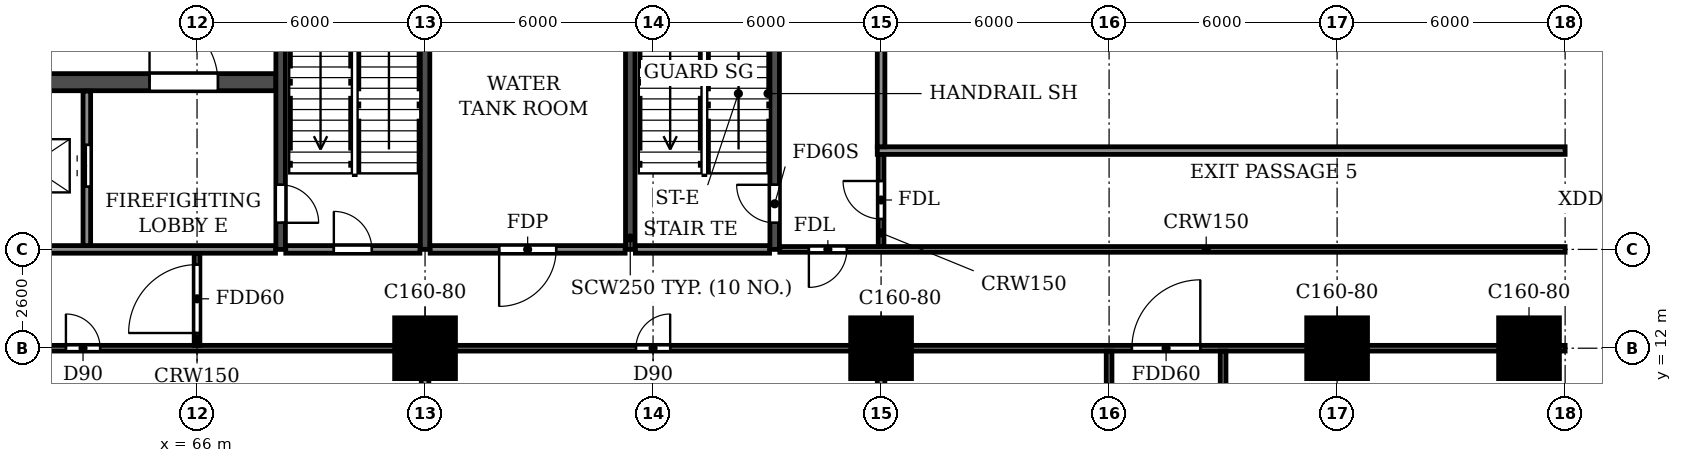
"""IFC4 building model, lengths in metres.
Left out: names, types, materials, properties, quantities, classifications, styles, units other than length and angle.
Written with IfcOpenShell. Run it as: python <this file> out.ifc"""

import sys

from ifc_helpers import new_model, si_unit, direction, frame, frame_2d, origin, origin_2d, place, context, subcontext, project, spatial, rectangle, extrude, source, transform, mapped, element, fill, save


model = new_model("IFC4")
c1 = context("Model", 3, precision=1e-05, world=origin(), true_north=direction((0.0, 1.0)))
c2 = subcontext(c1, "Body", "Model", "MODEL_VIEW")
j1 = project(units=[si_unit("LENGTHUNIT", "METRE"), si_unit("PLANEANGLEUNIT", "RADIAN")], contexts=[c1])
p1 = place(None, origin())
s1 = spatial("IfcSite", under=j1, at=p1, CompositionType="ELEMENT")
p2 = place(p1, origin())
s2 = spatial("IfcBuilding", under=s1, at=p2, CompositionType="ELEMENT")
p3 = place(p2, origin())
s3 = spatial("IfcBuildingStorey", under=s2, at=p3, CompositionType="ELEMENT", Elevation=0.0)
m1 = source(origin(), c2, "Body", "SweptSolid", [
    extrude(rectangle(XDim=1.6, YDim=1.6, at=origin_2d()), origin(), (0.0, 0.0, 1.0), 4.5),
])
for number, where, z_axis, x_axis in (
    (1, (72.0, 12.0, -0.3), (0.0, 0.0, 1.0), (1.0, 0.0, 0.0)),
    (2, (84.0, 12.0, -0.3), (0.0, 0.0, 1.0), (1.0, 0.0, 0.0)),
    (3, (96.0, 12.0, -0.3), (0.0, 0.0, 1.0), (1.0, 0.0, 0.0)),
    (4, (101.05, 12.0, -0.3), (0.0, 0.0, 1.0), (1.0, 0.0, 0.0)),
):
    element("IfcColumn", number, at=place(p3, frame(where, z_axis=z_axis, x_axis=x_axis)), inside=s3, PredefinedType="COLUMN", context=c2, shape_type="MappedRepresentation", body=[
        mapped(m1, transform((0.0, 0.0, 0.0))),
    ])
p4 = place(p3, frame((33.925, 19.0, 0.0), z_axis=(0.0, 0.0, 1.0), x_axis=(1.0, 0.0, 0.0)))
e5 = element("IfcWall", 5, at=p4, inside=s3, PredefinedType="SOLIDWALL", context=c2, shape_type="SweptSolid", body=[
    extrude(rectangle(XDim=34.15, YDim=0.45, at=frame_2d((17.075, 0.0))), origin(), (0.0, 0.0, 1.0), 4.2),
])
p5 = place(p4, frame((16.175, 0.0, 0.0)))
e6 = element("IfcOpeningElement", 6, at=p5, cuts=e5, PredefinedType="OPENING", context=c2, shape_type="SweptSolid", body=[
    extrude(rectangle(XDim=1.8, YDim=2.1, at=frame_2d((0.9, 1.05))), frame((0.0, 0.235, 0.0), z_axis=(0.0, -1.0, 0.0), x_axis=(1.0, 0.0, 0.0)), (0.0, 0.0, 1.0), 0.47),
])
p6 = place(p4, frame((1.525, 0.0, 0.0)))
e7 = element("IfcOpeningElement", 7, at=p6, cuts=e5, PredefinedType="OPENING", context=c2, shape_type="SweptSolid", body=[
    extrude(rectangle(XDim=1.8, YDim=2.1, at=frame_2d((0.9, 1.05))), frame((0.0, 0.235, 0.0), z_axis=(0.0, -1.0, 0.0), x_axis=(1.0, 0.0, 0.0)), (0.0, 0.0, 1.0), 0.47),
])
p7 = place(p4, frame((8.725, 0.0, 0.0)))
e8 = element("IfcOpeningElement", 8, at=p7, cuts=e5, PredefinedType="OPENING", context=c2, shape_type="SweptSolid", body=[
    extrude(rectangle(XDim=1.1, YDim=2.1, at=frame_2d((0.55, 1.05))), frame((0.0, 0.235, 0.0), z_axis=(0.0, -1.0, 0.0), x_axis=(1.0, 0.0, 0.0)), (0.0, 0.0, 1.0), 0.47),
])
p8 = place(p4, frame((11.325, 0.0, 0.0)))
e9 = element("IfcOpeningElement", 9, at=p8, cuts=e5, PredefinedType="OPENING", context=c2, shape_type="SweptSolid", body=[
    extrude(rectangle(XDim=1.1, YDim=2.1, at=frame_2d((0.55, 1.05))), frame((0.0, 0.235, 0.0), z_axis=(0.0, -1.0, 0.0), x_axis=(1.0, 0.0, 0.0)), (0.0, 0.0, 1.0), 0.47),
])
p9 = place(p4, frame((13.925, 0.0, 0.0)))
e10 = element("IfcOpeningElement", 10, at=p9, cuts=e5, PredefinedType="OPENING", context=c2, shape_type="SweptSolid", body=[
    extrude(rectangle(XDim=1.1, YDim=2.1, at=frame_2d((0.55, 1.05))), frame((0.0, 0.235, 0.0), z_axis=(0.0, -1.0, 0.0), x_axis=(1.0, 0.0, 0.0)), (0.0, 0.0, 1.0), 0.47),
])
p10 = place(p4, frame((19.125, 0.0, 0.0)))
e11 = element("IfcOpeningElement", 11, at=p10, cuts=e5, PredefinedType="OPENING", context=c2, shape_type="SweptSolid", body=[
    extrude(rectangle(XDim=1.1, YDim=2.1, at=frame_2d((0.55, 1.05))), frame((0.0, 0.235, 0.0), z_axis=(0.0, -1.0, 0.0), x_axis=(1.0, 0.0, 0.0)), (0.0, 0.0, 1.0), 0.47),
])
p11 = place(p4, frame((21.725, 0.0, 0.0)))
e12 = element("IfcOpeningElement", 12, at=p11, cuts=e5, PredefinedType="OPENING", context=c2, shape_type="SweptSolid", body=[
    extrude(rectangle(XDim=1.1, YDim=2.1, at=frame_2d((0.55, 1.05))), frame((0.0, 0.235, 0.0), z_axis=(0.0, -1.0, 0.0), x_axis=(1.0, 0.0, 0.0)), (0.0, 0.0, 1.0), 0.47),
])
p12 = place(p4, frame((24.325, 0.0, 0.0)))
e13 = element("IfcOpeningElement", 13, at=p12, cuts=e5, PredefinedType="OPENING", context=c2, shape_type="SweptSolid", body=[
    extrude(rectangle(XDim=1.1, YDim=2.1, at=frame_2d((0.55, 1.05))), frame((0.0, 0.235, 0.0), z_axis=(0.0, -1.0, 0.0), x_axis=(1.0, 0.0, 0.0)), (0.0, 0.0, 1.0), 0.47),
])
p13 = place(p4, frame((30.825, 0.0, 0.0)))
e14 = element("IfcOpeningElement", 14, at=p13, cuts=e5, PredefinedType="OPENING", context=c2, shape_type="SweptSolid", body=[
    extrude(rectangle(XDim=1.8, YDim=2.1, at=frame_2d((0.9, 1.05))), frame((0.0, 0.235, 0.0), z_axis=(0.0, -1.0, 0.0), x_axis=(1.0, 0.0, 0.0)), (0.0, 0.0, 1.0), 0.47),
])
p14 = place(p3, frame((68.2, 14.6, 0.0), z_axis=(0.0, 0.0, 1.0), x_axis=(0.0, 1.0, 0.0)))
e15 = element("IfcWall", 15, at=p14, inside=s3, PredefinedType="SOLIDWALL", context=c2, shape_type="SweptSolid", body=[
    extrude(rectangle(XDim=7.875, YDim=0.25, at=frame_2d((3.938, 0.0))), origin(), (0.0, 0.0, 1.0), 4.2),
])
p15 = place(p14, frame((0.7, 0.0, 0.0)))
e16 = element("IfcOpeningElement", 16, at=p15, cuts=e15, PredefinedType="OPENING", context=c2, shape_type="SweptSolid", body=[
    extrude(rectangle(XDim=1.0, YDim=2.1, at=frame_2d((0.5, 1.05))), frame((0.0, 0.135, 0.0), z_axis=(0.0, -1.0, 0.0), x_axis=(1.0, 0.0, 0.0)), (0.0, 0.0, 1.0), 0.27),
])
for number, where, z_axis, x_axis in (
    (17, (72.0, 14.6, 0.0), (0.0, 0.0, 1.0), (0.0, 1.0, 0.0)),
    (18, (77.4, 14.6, 0.0), (0.0, 0.0, 1.0), (0.0, 1.0, 0.0)),
):
    element("IfcWall", number, at=place(p3, frame(where, z_axis=z_axis, x_axis=x_axis)), inside=s3, PredefinedType="SOLIDWALL", context=c2, shape_type="SweptSolid", body=[
        extrude(rectangle(XDim=7.875, YDim=0.25, at=frame_2d((3.938, 0.0))), origin(), (0.0, 0.0, 1.0), 4.2),
    ])
p16 = place(p3, frame((81.2, 14.6, 0.0), z_axis=(0.0, 0.0, 1.0), x_axis=(0.0, 1.0, 0.0)))
e19 = element("IfcWall", 19, at=p16, inside=s3, PredefinedType="SOLIDWALL", context=c2, shape_type="SweptSolid", body=[
    extrude(rectangle(XDim=7.875, YDim=0.25, at=frame_2d((3.938, 0.0))), origin(), (0.0, 0.0, 1.0), 4.2),
])
p17 = place(p16, frame((0.7, 0.0, 0.0)))
e20 = element("IfcOpeningElement", 20, at=p17, cuts=e19, PredefinedType="OPENING", context=c2, shape_type="SweptSolid", body=[
    extrude(rectangle(XDim=1.0, YDim=2.1, at=frame_2d((0.5, 1.05))), frame((0.0, 0.135, 0.0), z_axis=(0.0, -1.0, 0.0), x_axis=(1.0, 0.0, 0.0)), (0.0, 0.0, 1.0), 0.27),
])
p18 = place(p3, frame((38.9, 12.0, 0.0), z_axis=(0.0, 0.0, 1.0), x_axis=(1.0, 0.0, 0.0)))
e21 = element("IfcWall", 21, at=p18, inside=s3, PredefinedType="PARTITIONING", context=c2, shape_type="SweptSolid", body=[
    extrude(rectangle(XDim=63.1, YDim=0.15, at=frame_2d((31.55, 0.0))), origin(), (0.0, 0.0, 1.0), 4.2),
])
p19 = place(p18, frame((10.2, 0.0, 0.0)))
e22 = element("IfcOpeningElement", 22, at=p19, cuts=e21, PredefinedType="OPENING", context=c2, shape_type="SweptSolid", body=[
    extrude(rectangle(XDim=1.8, YDim=2.1, at=frame_2d((0.9, 1.05))), frame((0.0, 0.085, 0.0), z_axis=(0.0, -1.0, 0.0), x_axis=(1.0, 0.0, 0.0)), (0.0, 0.0, 1.0), 0.17),
])
p20 = place(p18, frame((23.65, 0.0, 0.0)))
e23 = element("IfcOpeningElement", 23, at=p20, cuts=e21, PredefinedType="OPENING", context=c2, shape_type="SweptSolid", body=[
    extrude(rectangle(XDim=0.9, YDim=2.1, at=frame_2d((0.45, 1.05))), frame((0.0, 0.085, 0.0), z_axis=(0.0, -1.0, 0.0), x_axis=(1.0, 0.0, 0.0)), (0.0, 0.0, 1.0), 0.17),
])
p21 = place(p18, frame((38.65, 0.0, 0.0)))
e24 = element("IfcOpeningElement", 24, at=p21, cuts=e21, PredefinedType="OPENING", context=c2, shape_type="SweptSolid", body=[
    extrude(rectangle(XDim=0.9, YDim=2.1, at=frame_2d((0.45, 1.05))), frame((0.0, 0.085, 0.0), z_axis=(0.0, -1.0, 0.0), x_axis=(1.0, 0.0, 0.0)), (0.0, 0.0, 1.0), 0.17),
])
p22 = place(p18, frame((51.7, 0.0, 0.0)))
e25 = element("IfcOpeningElement", 25, at=p22, cuts=e21, PredefinedType="OPENING", context=c2, shape_type="SweptSolid", body=[
    extrude(rectangle(XDim=1.8, YDim=2.1, at=frame_2d((0.9, 1.05))), frame((0.0, 0.085, 0.0), z_axis=(0.0, -1.0, 0.0), x_axis=(1.0, 0.0, 0.0)), (0.0, 0.0, 1.0), 0.17),
])
p23 = place(p3, frame((81.335, 14.6, 0.0), z_axis=(0.0, 0.0, 1.0), x_axis=(1.0, 0.0, 0.0)))
e26 = element("IfcWall", 26, at=p23, inside=s3, PredefinedType="PARTITIONING", context=c2, shape_type="SweptSolid", body=[
    extrude(rectangle(XDim=20.665, YDim=0.15, at=frame_2d((10.333, 0.0))), origin(), (0.0, 0.0, 1.0), 4.2),
])
p24 = place(p23, frame((0.765, 0.0, 0.0)))
e27 = element("IfcOpeningElement", 27, at=p24, cuts=e26, PredefinedType="OPENING", context=c2, shape_type="SweptSolid", body=[
    extrude(rectangle(XDim=1.0, YDim=2.1, at=frame_2d((0.5, 1.05))), frame((0.0, 0.085, 0.0), z_axis=(0.0, -1.0, 0.0), x_axis=(1.0, 0.0, 0.0)), (0.0, 0.0, 1.0), 0.17),
])
p25 = place(p3, frame((66.0, 12.075, 0.0), z_axis=(0.0, 0.0, 1.0), x_axis=(0.0, 1.0, 0.0)))
e28 = element("IfcWall", 28, at=p25, inside=s3, PredefinedType="PARTITIONING", context=c2, shape_type="SweptSolid", body=[
    extrude(rectangle(XDim=2.425, YDim=0.15, at=frame_2d((1.212, 0.0))), origin(), (0.0, 0.0, 1.0), 4.2),
])
p26 = place(p25, frame((0.325, 0.0, 0.0)))
e29 = element("IfcOpeningElement", 29, at=p26, cuts=e28, PredefinedType="OPENING", context=c2, shape_type="SweptSolid", body=[
    extrude(rectangle(XDim=1.8, YDim=2.1, at=frame_2d((0.9, 1.05))), frame((0.0, 0.085, 0.0), z_axis=(0.0, -1.0, 0.0), x_axis=(1.0, 0.0, 0.0)), (0.0, 0.0, 1.0), 0.17),
])
p27 = place(p3, frame((84.0, 14.675, 0.0), z_axis=(0.0, 0.0, 1.0), x_axis=(0.0, 1.0, 0.0)))
e30 = element("IfcWall", 30, at=p27, inside=s3, PredefinedType="PARTITIONING", context=c2, shape_type="SweptSolid", body=[
    extrude(rectangle(XDim=2.425, YDim=0.15, at=frame_2d((1.212, 0.0))), origin(), (0.0, 0.0, 1.0), 4.2),
])
p28 = place(p27, frame((0.725, 0.0, 0.0)))
e31 = element("IfcOpeningElement", 31, at=p28, cuts=e30, PredefinedType="OPENING", context=c2, shape_type="SweptSolid", body=[
    extrude(rectangle(XDim=1.0, YDim=2.1, at=frame_2d((0.5, 1.05))), frame((0.0, 0.085, 0.0), z_axis=(0.0, -1.0, 0.0), x_axis=(1.0, 0.0, 0.0)), (0.0, 0.0, 1.0), 0.17),
])
p29 = place(p3, frame((90.0, 0.06, 0.0), z_axis=(0.0, 0.0, 1.0), x_axis=(0.0, 1.0, 0.0)))
e32 = element("IfcWall", 32, at=p29, inside=s3, PredefinedType="PARTITIONING", context=c2, shape_type="SweptSolid", body=[
    extrude(rectangle(XDim=11.865, YDim=0.15, at=frame_2d((5.933, 0.0))), origin(), (0.0, 0.0, 1.0), 4.2),
])
p30 = place(p29, frame((5.49, 0.0, 0.0)))
e33 = element("IfcOpeningElement", 33, at=p30, cuts=e32, PredefinedType="OPENING", context=c2, shape_type="SweptSolid", body=[
    extrude(rectangle(XDim=0.9, YDim=2.1, at=frame_2d((0.45, 1.05))), frame((0.0, 0.085, 0.0), z_axis=(0.0, -1.0, 0.0), x_axis=(1.0, 0.0, 0.0)), (0.0, 0.0, 1.0), 0.17),
])
p31 = place(p3, frame((93.0, 0.06, 0.0), z_axis=(0.0, 0.0, 1.0), x_axis=(0.0, 1.0, 0.0)))
e34 = element("IfcWall", 34, at=p31, inside=s3, PredefinedType="PARTITIONING", context=c2, shape_type="SweptSolid", body=[
    extrude(rectangle(XDim=11.865, YDim=0.15, at=frame_2d((5.933, 0.0))), origin(), (0.0, 0.0, 1.0), 4.2),
])
p32 = place(p31, frame((5.49, 0.0, 0.0)))
e35 = element("IfcOpeningElement", 35, at=p32, cuts=e34, PredefinedType="OPENING", context=c2, shape_type="SweptSolid", body=[
    extrude(rectangle(XDim=0.9, YDim=2.1, at=frame_2d((0.45, 1.05))), frame((0.0, 0.085, 0.0), z_axis=(0.0, -1.0, 0.0), x_axis=(1.0, 0.0, 0.0)), (0.0, 0.0, 1.0), 0.17),
])
p33 = place(p3, frame((72.135, 14.6, 0.0), z_axis=(0.0, 0.0, 1.0), x_axis=(1.0, 0.0, 0.0)))
e36 = element("IfcWall", 36, at=p33, inside=s3, PredefinedType="PARTITIONING", context=c2, shape_type="SweptSolid", body=[
    extrude(rectangle(XDim=5.13, YDim=0.2, at=frame_2d((2.565, 0.0))), origin(), (0.0, 0.0, 1.0), 4.2),
])
p34 = place(p33, frame((1.815, 0.0, 0.0)))
e37 = element("IfcOpeningElement", 37, at=p34, cuts=e36, PredefinedType="OPENING", context=c2, shape_type="SweptSolid", body=[
    extrude(rectangle(XDim=1.5, YDim=2.1, at=frame_2d((0.75, 1.05))), frame((0.0, 0.11, 0.0), z_axis=(0.0, -1.0, 0.0), x_axis=(1.0, 0.0, 0.0)), (0.0, 0.0, 1.0), 0.22),
])
p35 = place(p3, frame((83.9, 17.2, 0.0), z_axis=(0.0, 0.0, 1.0), x_axis=(1.0, 0.0, 0.0)))
e38 = element("IfcWall", 38, at=p35, inside=s3, PredefinedType="PARTITIONING", context=c2, shape_type="SweptSolid", body=[
    extrude(rectangle(XDim=18.1, YDim=0.2, at=frame_2d((9.05, 0.0))), origin(), (0.0, 0.0, 1.0), 4.2),
])
p36 = place(p3, frame((84.0, 17.3, 0.0), z_axis=(0.0, 0.0, 1.0), x_axis=(0.0, 1.0, 0.0)))
e39 = element("IfcWall", 39, at=p36, inside=s3, PredefinedType="PARTITIONING", context=c2, shape_type="SweptSolid", body=[
    extrude(rectangle(XDim=10.4, YDim=0.2, at=frame_2d((5.2, 0.0))), origin(), (0.0, 0.0, 1.0), 4.2),
])
for number, where, z_axis, x_axis in (
    (40, (72.0, 0.06, 0.0), (0.0, 0.0, 1.0), (0.0, 1.0, 0.0)),
    (41, (84.0, 0.06, 0.0), (0.0, 0.0, 1.0), (0.0, 1.0, 0.0)),
):
    element("IfcWall", number, at=place(p3, frame(where, z_axis=z_axis, x_axis=x_axis)), inside=s3, PredefinedType="PARTITIONING", context=c2, shape_type="SweptSolid", body=[
        extrude(rectangle(XDim=11.865, YDim=0.2, at=frame_2d((5.933, 0.0))), origin(), (0.0, 0.0, 1.0), 4.2),
    ])
p37 = place(p3, frame((60.0, 14.6, 0.0), z_axis=(0.0, 0.0, 1.0), x_axis=(1.0, 0.0, 0.0)))
e42 = element("IfcWall", 42, at=p37, inside=s3, PredefinedType="PARTITIONING", context=c2, shape_type="SweptSolid", body=[
    extrude(rectangle(XDim=8.065, YDim=0.2, at=frame_2d((4.032, 0.0))), origin(), (0.0, 0.0, 1.0), 4.2),
])
p38 = place(p3, frame((63.1, 14.7, 0.0), z_axis=(0.0, 0.0, 1.0), x_axis=(0.0, 1.0, 0.0)))
e43 = element("IfcWall", 43, at=p38, inside=s3, PredefinedType="PARTITIONING", context=c2, shape_type="SweptSolid", body=[
    extrude(rectangle(XDim=4.065, YDim=0.2, at=frame_2d((2.032, 0.0))), origin(), (0.0, 0.0, 1.0), 4.2),
])
p39 = place(p38, frame((1.55, 0.0, 0.0)))
e44 = element("IfcOpeningElement", 44, at=p39, cuts=e43, PredefinedType="OPENING", context=c2, shape_type="SweptSolid", body=[
    extrude(rectangle(XDim=1.1, YDim=2.1, at=frame_2d((0.55, 1.05))), frame((0.0, 0.11, 0.0), z_axis=(0.0, -1.0, 0.0), x_axis=(1.0, 0.0, 0.0)), (0.0, 0.0, 1.0), 0.22),
])
p40 = place(p3, frame((68.335, 14.6, 0.0), z_axis=(0.0, 0.0, 1.0), x_axis=(1.0, 0.0, 0.0)))
e45 = element("IfcWall", 45, at=p40, inside=s3, PredefinedType="PARTITIONING", context=c2, shape_type="SweptSolid", body=[
    extrude(rectangle(XDim=3.53, YDim=0.2, at=frame_2d((1.765, 0.0))), origin(), (0.0, 0.0, 1.0), 4.2),
])
p41 = place(p40, frame((1.265, 0.0, 0.0)))
e46 = element("IfcOpeningElement", 46, at=p41, cuts=e45, PredefinedType="OPENING", context=c2, shape_type="SweptSolid", body=[
    extrude(rectangle(XDim=1.0, YDim=2.1, at=frame_2d((0.5, 1.05))), frame((0.0, 0.11, 0.0), z_axis=(0.0, -1.0, 0.0), x_axis=(1.0, 0.0, 0.0)), (0.0, 0.0, 1.0), 0.22),
])
p42 = place(p3, frame((77.535, 14.6, 0.0), z_axis=(0.0, 0.0, 1.0), x_axis=(1.0, 0.0, 0.0)))
e47 = element("IfcWall", 47, at=p42, inside=s3, PredefinedType="PARTITIONING", context=c2, shape_type="SweptSolid", body=[
    extrude(rectangle(XDim=3.53, YDim=0.2, at=frame_2d((1.765, 0.0))), origin(), (0.0, 0.0, 1.0), 4.2),
])
p43 = place(p20, origin())
e48 = element("IfcDoor", 48, at=p43, inside=s3, OperationType="SINGLE_SWING_LEFT", PredefinedType="DOOR", context=c2, shape_type="SweptSolid", body=[
    extrude(rectangle(XDim=0.9, YDim=2.1, at=frame_2d((0.45, 1.05))), frame((0.0, 0.025, 0.0), z_axis=(0.0, -1.0, 0.0), x_axis=(1.0, 0.0, 0.0)), (0.0, 0.0, 1.0), 0.05),
])
fill(e23, e48)
p44 = place(p26, origin())
e49 = element("IfcDoor", 49, at=p44, inside=s3, OperationType="DOUBLE_DOOR_SINGLE_SWING", PredefinedType="DOOR", context=c2, shape_type="SweptSolid", body=[
    extrude(rectangle(XDim=1.8, YDim=2.1, at=frame_2d((0.9, 1.05))), frame((0.0, 0.025, 0.0), z_axis=(0.0, -1.0, 0.0), x_axis=(1.0, 0.0, 0.0)), (0.0, 0.0, 1.0), 0.05),
])
fill(e29, e49)
p45 = place(p41, origin())
e50 = element("IfcDoor", 50, at=p45, inside=s3, OperationType="SINGLE_SWING_LEFT", PredefinedType="DOOR", context=c2, shape_type="SweptSolid", body=[
    extrude(rectangle(XDim=1.0, YDim=2.1, at=frame_2d((0.5, 1.05))), frame((0.0, 0.025, 0.0), z_axis=(0.0, -1.0, 0.0), x_axis=(1.0, 0.0, 0.0)), (0.0, 0.0, 1.0), 0.05),
])
fill(e46, e50)
p46 = place(p34, frame((1.5, 0.0, 0.0), z_axis=(0.0, 0.0, 1.0), x_axis=(-1.0, 0.0, 0.0)))
e51 = element("IfcDoor", 51, at=p46, inside=s3, OperationType="DOUBLE_DOOR_SINGLE_SWING", PredefinedType="DOOR", context=c2, shape_type="SweptSolid", body=[
    extrude(rectangle(XDim=1.5, YDim=2.1, at=frame_2d((0.75, 1.05))), frame((0.0, 0.025, 0.0), z_axis=(0.0, -1.0, 0.0), x_axis=(1.0, 0.0, 0.0)), (0.0, 0.0, 1.0), 0.05),
])
fill(e37, e51)
p47 = place(p21, origin())
e52 = element("IfcDoor", 52, at=p47, inside=s3, OperationType="SINGLE_SWING_RIGHT", PredefinedType="DOOR", context=c2, shape_type="SweptSolid", body=[
    extrude(rectangle(XDim=0.9, YDim=2.1, at=frame_2d((0.45, 1.05))), frame((0.0, 0.025, 0.0), z_axis=(0.0, -1.0, 0.0), x_axis=(1.0, 0.0, 0.0)), (0.0, 0.0, 1.0), 0.05),
])
fill(e24, e52)
p48 = place(p24, frame((1.0, 0.0, 0.0), z_axis=(0.0, 0.0, 1.0), x_axis=(-1.0, 0.0, 0.0)))
e53 = element("IfcDoor", 53, at=p48, inside=s3, OperationType="SINGLE_SWING_RIGHT", PredefinedType="DOOR", context=c2, shape_type="SweptSolid", body=[
    extrude(rectangle(XDim=1.0, YDim=2.1, at=frame_2d((0.5, 1.05))), frame((0.0, 0.025, 0.0), z_axis=(0.0, -1.0, 0.0), x_axis=(1.0, 0.0, 0.0)), (0.0, 0.0, 1.0), 0.05),
])
fill(e27, e53)
p49 = place(p22, origin())
e54 = element("IfcDoor", 54, at=p49, inside=s3, OperationType="DOUBLE_DOOR_SINGLE_SWING", PredefinedType="DOOR", context=c2, shape_type="SweptSolid", body=[
    extrude(rectangle(XDim=1.8, YDim=2.1, at=frame_2d((0.9, 1.05))), frame((0.0, 0.025, 0.0), z_axis=(0.0, -1.0, 0.0), x_axis=(1.0, 0.0, 0.0)), (0.0, 0.0, 1.0), 0.05),
])
fill(e25, e54)
p50 = place(p39, origin())
e55 = element("IfcDoor", 55, at=p50, inside=s3, OperationType="DOUBLE_DOOR_SLIDING", PredefinedType="DOOR", context=c2, shape_type="SweptSolid", body=[
    extrude(rectangle(XDim=1.1, YDim=2.1, at=frame_2d((0.55, 1.05))), frame((0.0, 0.025, 0.0), z_axis=(0.0, -1.0, 0.0), x_axis=(1.0, 0.0, 0.0)), (0.0, 0.0, 1.0), 0.05),
])
fill(e44, e55)
p51 = place(p15, frame((1.0, 0.0, 0.0), z_axis=(0.0, 0.0, 1.0), x_axis=(-1.0, 0.0, 0.0)))
e56 = element("IfcDoor", 56, at=p51, inside=s3, OperationType="SINGLE_SWING_RIGHT", PredefinedType="DOOR", context=c2, shape_type="SweptSolid", body=[
    extrude(rectangle(XDim=1.0, YDim=2.1, at=frame_2d((0.5, 1.05))), frame((0.0, 0.025, 0.0), z_axis=(0.0, -1.0, 0.0), x_axis=(1.0, 0.0, 0.0)), (0.0, 0.0, 1.0), 0.05),
])
fill(e16, e56)
p52 = place(p13, origin())
e57 = element("IfcDoor", 57, at=p52, inside=s3, OperationType="DOUBLE_DOOR_SINGLE_SWING", PredefinedType="DOOR", context=c2, shape_type="SweptSolid", body=[
    extrude(rectangle(XDim=1.8, YDim=2.1, at=frame_2d((0.9, 1.05))), frame((0.0, 0.025, 0.0), z_axis=(0.0, -1.0, 0.0), x_axis=(1.0, 0.0, 0.0)), (0.0, 0.0, 1.0), 0.05),
])
fill(e14, e57)
p53 = place(p17, origin())
e58 = element("IfcDoor", 58, at=p53, inside=s3, OperationType="SINGLE_SWING_RIGHT", PredefinedType="DOOR", context=c2, shape_type="SweptSolid", body=[
    extrude(rectangle(XDim=1.0, YDim=2.1, at=frame_2d((0.5, 1.05))), frame((0.0, 0.025, 0.0), z_axis=(0.0, -1.0, 0.0), x_axis=(1.0, 0.0, 0.0)), (0.0, 0.0, 1.0), 0.05),
])
fill(e20, e58)
p54 = place(p28, origin())
e59 = element("IfcDoor", 59, at=p54, inside=s3, OperationType="SINGLE_SWING_RIGHT", PredefinedType="DOOR", context=c2, shape_type="SweptSolid", body=[
    extrude(rectangle(XDim=1.0, YDim=2.1, at=frame_2d((0.5, 1.05))), frame((0.0, 0.025, 0.0), z_axis=(0.0, -1.0, 0.0), x_axis=(1.0, 0.0, 0.0)), (0.0, 0.0, 1.0), 0.05),
])
fill(e31, e59)
save(model, sys.argv[1])
